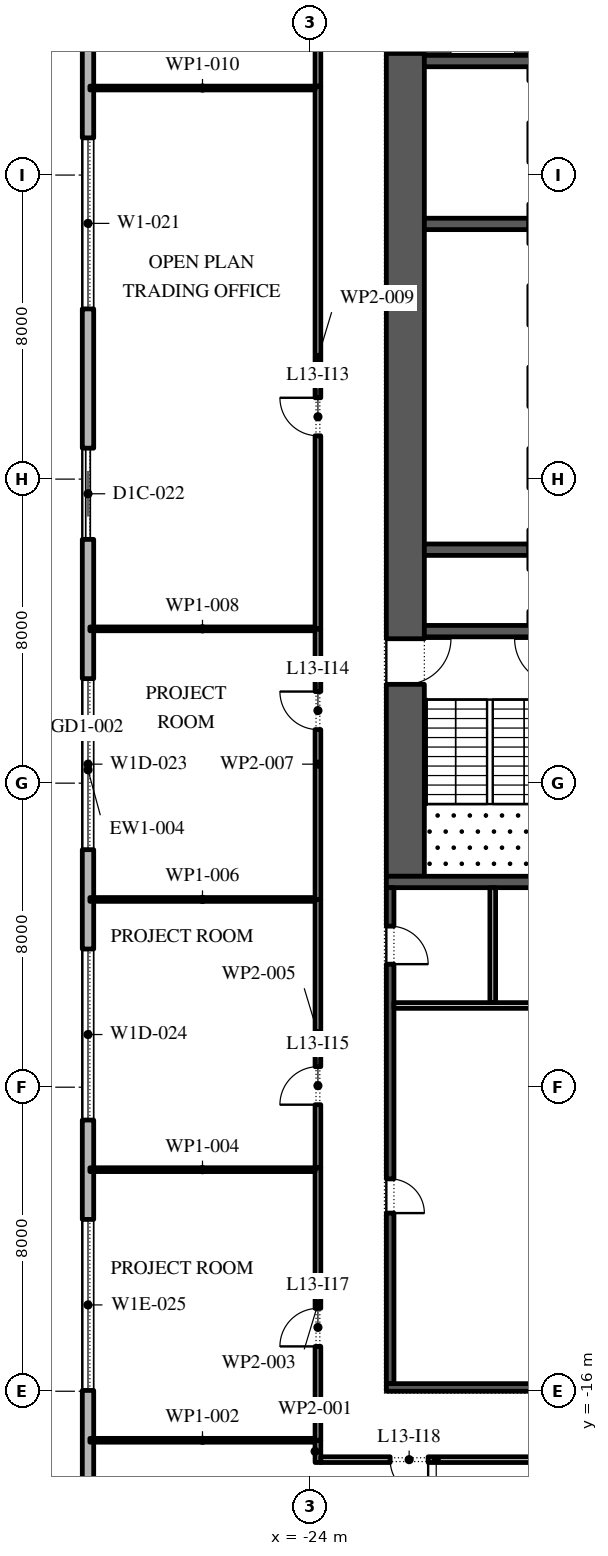
"""IFC4 building model, lengths in metres.
Left out: names, types, materials, properties, quantities, classifications, styles, units other than length and angle.
Written with IfcOpenShell. Run it as: python <this file> out.ifc"""

import sys

from ifc_helpers import new_model, si_unit, direction, frame, frame_2d, origin, place, context, subcontext, project, spatial, rectangle, extrude, element, fill, save


model = new_model("IFC4")
c1 = context("Model", 3, precision=1e-05, world=origin(), true_north=direction((0.0, 1.0)))
c2 = subcontext(c1, "Body", "Model", "MODEL_VIEW")
j1 = project(units=[si_unit("LENGTHUNIT", "METRE"), si_unit("PLANEANGLEUNIT", "RADIAN")], contexts=[c1])
p1 = place(None, origin())
s1 = spatial("IfcSite", under=j1, at=p1, CompositionType="ELEMENT")
p2 = place(p1, origin())
s2 = spatial("IfcBuilding", under=s1, at=p2, CompositionType="ELEMENT")
p3 = place(p2, frame((0.0, 0.0, 64.8)))
s3 = spatial("IfcBuildingStorey", under=s2, at=p3, CompositionType="ELEMENT", Elevation=64.8)
p4 = place(p3, frame((-29.85, 25.1, 0.0), z_axis=(0.0, 0.0, 1.0), x_axis=(0.0, -1.0, 0.0)))
e1 = element("IfcWall", 1, at=p4, inside=s3, PredefinedType="STANDARD", context=c2, shape_type="SweptSolid", body=[
    extrude(rectangle(XDim=49.5, YDim=0.3, at=frame_2d((24.75, 0.0))), origin(), (0.0, 0.0, 1.0), 4.0),
])
p5 = place(p4, frame((1.157, 0.0, 0.45)))
e2 = element("IfcOpeningElement", 2, at=p5, cuts=e1, PredefinedType="OPENING", context=c2, shape_type="SweptSolid", body=[
    extrude(rectangle(XDim=4.5, YDim=2.875, at=frame_2d((2.25, 1.438))), frame((0.0, 0.16, 0.0), z_axis=(0.0, -1.0, 0.0), x_axis=(1.0, 0.0, 0.0)), (0.0, 0.0, 1.0), 0.32),
])
p6 = place(p4, frame((8.121, 0.0, 0.45)))
e3 = element("IfcOpeningElement", 3, at=p6, cuts=e1, PredefinedType="OPENING", context=c2, shape_type="SweptSolid", body=[
    extrude(rectangle(XDim=4.5, YDim=3.05, at=frame_2d((2.25, 1.525))), frame((0.0, 0.16, 0.0), z_axis=(0.0, -1.0, 0.0), x_axis=(1.0, 0.0, 0.0)), (0.0, 0.0, 1.0), 0.32),
])
p7 = place(p4, frame((16.286, 0.0, 0.0)))
e4 = element("IfcOpeningElement", 4, at=p7, cuts=e1, PredefinedType="OPENING", context=c2, shape_type="SweptSolid", body=[
    extrude(rectangle(XDim=2.4, YDim=3.325, at=frame_2d((1.2, 1.663))), frame((0.0, 0.16, 0.0), z_axis=(0.0, -1.0, 0.0), x_axis=(1.0, 0.0, 0.0)), (0.0, 0.0, 1.0), 0.32),
])
p8 = place(p4, frame((22.35, 0.0, 0.45)))
e5 = element("IfcOpeningElement", 5, at=p8, cuts=e1, PredefinedType="OPENING", context=c2, shape_type="SweptSolid", body=[
    extrude(rectangle(XDim=4.5, YDim=2.875, at=frame_2d((2.25, 1.438))), frame((0.0, 0.16, 0.0), z_axis=(0.0, -1.0, 0.0), x_axis=(1.0, 0.0, 0.0)), (0.0, 0.0, 1.0), 0.32),
])
p9 = place(p4, frame((29.464, 0.0, 0.45)))
e6 = element("IfcOpeningElement", 6, at=p9, cuts=e1, PredefinedType="OPENING", context=c2, shape_type="SweptSolid", body=[
    extrude(rectangle(XDim=4.5, YDim=2.875, at=frame_2d((2.25, 1.438))), frame((0.0, 0.16, 0.0), z_axis=(0.0, -1.0, 0.0), x_axis=(1.0, 0.0, 0.0)), (0.0, 0.0, 1.0), 0.32),
])
p10 = place(p4, frame((36.579, 0.0, 0.45)))
e7 = element("IfcOpeningElement", 7, at=p10, cuts=e1, PredefinedType="OPENING", context=c2, shape_type="SweptSolid", body=[
    extrude(rectangle(XDim=4.5, YDim=2.825, at=frame_2d((2.25, 1.413))), frame((0.0, 0.16, 0.0), z_axis=(0.0, -1.0, 0.0), x_axis=(1.0, 0.0, 0.0)), (0.0, 0.0, 1.0), 0.32),
])
p11 = place(p4, frame((44.743, 0.0, 0.0)))
e8 = element("IfcOpeningElement", 8, at=p11, cuts=e1, PredefinedType="OPENING", context=c2, shape_type="SweptSolid", body=[
    extrude(rectangle(XDim=2.4, YDim=3.5, at=frame_2d((1.2, 1.75))), frame((0.0, 0.16, 0.0), z_axis=(0.0, -1.0, 0.0), x_axis=(1.0, 0.0, 0.0)), (0.0, 0.0, 1.0), 0.32),
])
p12 = place(p3, frame((-21.5, -2.45, 0.0), z_axis=(0.0, 0.0, 1.0), x_axis=(0.0, 1.0, 0.0)))
e9 = element("IfcWall", 9, at=p12, inside=s3, PredefinedType="SHEAR", context=c2, shape_type="SweptSolid", body=[
    extrude(rectangle(XDim=27.9, YDim=1.0, at=frame_2d((13.95, 0.0))), origin(), (0.0, 0.0, 1.0), 4.0),
])
p13 = place(p12, frame((5.05, 0.0, 0.0)))
e10 = element("IfcOpeningElement", 10, at=p13, cuts=e9, PredefinedType="OPENING", context=c2, shape_type="SweptSolid", body=[
    extrude(rectangle(XDim=1.2, YDim=2.1, at=frame_2d((0.6, 1.05))), frame((0.0, 0.51, 0.0), z_axis=(0.0, -1.0, 0.0), x_axis=(1.0, 0.0, 0.0)), (0.0, 0.0, 1.0), 1.02),
])
p14 = place(p12, frame((21.65, 0.0, 0.0)))
e11 = element("IfcOpeningElement", 11, at=p14, cuts=e9, PredefinedType="OPENING", context=c2, shape_type="SweptSolid", body=[
    extrude(rectangle(XDim=1.2, YDim=2.1, at=frame_2d((0.6, 1.05))), frame((0.0, 0.51, 0.0), z_axis=(0.0, -1.0, 0.0), x_axis=(1.0, 0.0, 0.0)), (0.0, 0.0, 1.0), 1.02),
])
p15 = place(p3, frame((-22.0, -2.6, 0.0), z_axis=(0.0, 0.0, 1.0), x_axis=(1.0, 0.0, 0.0)))
e12 = element("IfcWall", 12, at=p15, inside=s3, PredefinedType="SHEAR", context=c2, shape_type="SweptSolid", body=[
    extrude(rectangle(XDim=12.0, YDim=0.3, at=frame_2d((6.0, 0.0))), origin(), (0.0, 0.0, 1.0), 4.0),
])
for number, where, z_axis, x_axis in (
    (13, (-21.0, 4.0, 0.0), (0.0, 0.0, 1.0), (1.0, 0.0, 0.0)),
    (14, (-21.0, 19.0, 0.0), (0.0, 0.0, 1.0), (1.0, 0.0, 0.0)),
):
    element("IfcWall", number, at=place(p3, frame(where, z_axis=z_axis, x_axis=x_axis)), inside=s3, PredefinedType="SHEAR", context=c2, shape_type="SweptSolid", body=[
        extrude(rectangle(XDim=3.7, YDim=0.3, at=frame_2d((1.85, 0.0))), origin(), (0.0, 0.0, 1.0), 4.0),
    ])
for number, where, z_axis, x_axis in (
    (15, (-21.0, 6.143, 0.0), (0.0, 0.0, 1.0), (1.0, 0.0, 0.0)),
    (16, (-21.0, 14.714, 0.0), (0.0, 0.0, 1.0), (1.0, 0.0, 0.0)),
):
    element("IfcWall", number, at=place(p3, frame(where, z_axis=z_axis, x_axis=x_axis)), inside=s3, PredefinedType="SHEAR", context=c2, shape_type="SweptSolid", body=[
        extrude(rectangle(XDim=2.75, YDim=0.3, at=frame_2d((1.375, 0.0))), origin(), (0.0, 0.0, 1.0), 4.0),
    ])
p16 = place(p3, frame((-21.9, -15.8, 0.0), z_axis=(0.0, 0.0, 1.0), x_axis=(0.0, 1.0, 0.0)))
e17 = element("IfcWall", 17, at=p16, inside=s3, PredefinedType="SHEAR", context=c2, shape_type="SweptSolid", body=[
    extrude(rectangle(XDim=13.05, YDim=0.2, at=frame_2d((6.525, 0.0))), origin(), (0.0, 0.0, 1.0), 4.0),
])
p17 = place(p16, frame((4.488, 0.0, 0.0)))
e18 = element("IfcOpeningElement", 18, at=p17, cuts=e17, PredefinedType="OPENING", context=c2, shape_type="SweptSolid", body=[
    extrude(rectangle(XDim=0.9, YDim=2.1, at=frame_2d((0.45, 1.05))), frame((0.0, 0.11, 0.0), z_axis=(0.0, -1.0, 0.0), x_axis=(1.0, 0.0, 0.0)), (0.0, 0.0, 1.0), 0.22),
])
p18 = place(p16, frame((11.038, 0.0, 0.0)))
e19 = element("IfcOpeningElement", 19, at=p18, cuts=e17, PredefinedType="OPENING", context=c2, shape_type="SweptSolid", body=[
    extrude(rectangle(XDim=1.0, YDim=2.1, at=frame_2d((0.5, 1.05))), frame((0.0, 0.11, 0.0), z_axis=(0.0, -1.0, 0.0), x_axis=(1.0, 0.0, 0.0)), (0.0, 0.0, 1.0), 0.22),
])
p19 = place(p3, frame((-22.0, -15.9, 0.0), z_axis=(0.0, 0.0, 1.0), x_axis=(1.0, 0.0, 0.0)))
e20 = element("IfcWall", 20, at=p19, inside=s3, PredefinedType="SHEAR", context=c2, shape_type="SweptSolid", body=[
    extrude(rectangle(XDim=12.0, YDim=0.2, at=frame_2d((6.0, 0.0))), origin(), (0.0, 0.0, 1.0), 4.0),
])
p20 = place(p3, frame((-21.8, -5.85, 0.0), z_axis=(0.0, 0.0, 1.0), x_axis=(1.0, 0.0, 0.0)))
e21 = element("IfcWall", 21, at=p20, inside=s3, PredefinedType="PARTITIONING", context=c2, shape_type="SweptSolid", body=[
    extrude(rectangle(XDim=5.725, YDim=0.15, at=frame_2d((2.863, 0.0))), origin(), (0.0, 0.0, 1.0), 4.0),
])
p21 = place(p3, frame((-19.2, -5.775, 0.0), z_axis=(0.0, 0.0, 1.0), x_axis=(0.0, 1.0, 0.0)))
e22 = element("IfcWall", 22, at=p21, inside=s3, PredefinedType="PARTITIONING", context=c2, shape_type="SweptSolid", body=[
    extrude(rectangle(XDim=3.025, YDim=0.15, at=frame_2d((1.512, 0.0))), origin(), (0.0, 0.0, 1.0), 4.0),
])
p22 = place(p3, frame((-23.8, -17.875, 0.0), z_axis=(0.0, 0.0, 1.0), x_axis=(0.0, 1.0, 0.0)))
e23 = element("IfcWall", 23, at=p22, inside=s3, PredefinedType="PARTITIONING", context=c2, shape_type="SweptSolid", body=[
    extrude(rectangle(XDim=0.585, YDim=0.15, at=frame_2d((0.292, 0.0))), origin(), (0.0, 0.0, 1.0), 4.0),
])
p23 = place(p3, frame((-23.875, -17.29, 0.0), z_axis=(0.0, 0.0, 1.0), x_axis=(-1.0, 0.0, 0.0)))
e24 = element("IfcWall", 24, at=p23, inside=s3, PredefinedType="PARTITIONING", context=c2, shape_type="SweptSolid", body=[
    extrude(rectangle(XDim=5.925, YDim=0.1, at=frame_2d((2.962, 0.0))), origin(), (0.0, 0.0, 1.0), 4.0),
])
p24 = place(p3, frame((-23.8, -17.29, 0.0), z_axis=(0.0, 0.0, 1.0), x_axis=(0.0, 1.0, 0.0)))
e25 = element("IfcWall", 25, at=p24, inside=s3, PredefinedType="PARTITIONING", context=c2, shape_type="SweptSolid", body=[
    extrude(rectangle(XDim=7.17, YDim=0.15, at=frame_2d((3.585, 0.0))), origin(), (0.0, 0.0, 1.0), 4.0),
])
p25 = place(p24, frame((2.47, 0.0, 0.0)))
e26 = element("IfcOpeningElement", 26, at=p25, cuts=e25, PredefinedType="OPENING", context=c2, shape_type="SweptSolid", body=[
    extrude(rectangle(XDim=1.0, YDim=2.1, at=frame_2d((0.5, 1.05))), frame((0.0, 0.085, 0.0), z_axis=(0.0, -1.0, 0.0), x_axis=(1.0, 0.0, 0.0)), (0.0, 0.0, 1.0), 0.17),
])
p26 = place(p3, frame((-23.875, -10.17, 0.0), z_axis=(0.0, 0.0, 1.0), x_axis=(-1.0, 0.0, 0.0)))
e27 = element("IfcWall", 27, at=p26, inside=s3, PredefinedType="PARTITIONING", context=c2, shape_type="SweptSolid", body=[
    extrude(rectangle(XDim=5.925, YDim=0.1, at=frame_2d((2.962, 0.0))), origin(), (0.0, 0.0, 1.0), 4.0),
])
p27 = place(p3, frame((-23.8, -10.12, 0.0), z_axis=(0.0, 0.0, 1.0), x_axis=(0.0, 1.0, 0.0)))
e28 = element("IfcWall", 28, at=p27, inside=s3, PredefinedType="PARTITIONING", context=c2, shape_type="SweptSolid", body=[
    extrude(rectangle(XDim=7.06, YDim=0.15, at=frame_2d((3.53, 0.0))), origin(), (0.0, 0.0, 1.0), 4.0),
])
p28 = place(p27, frame((1.66, 0.0, 0.0)))
e29 = element("IfcOpeningElement", 29, at=p28, cuts=e28, PredefinedType="OPENING", context=c2, shape_type="SweptSolid", body=[
    extrude(rectangle(XDim=1.0, YDim=2.1, at=frame_2d((0.5, 1.05))), frame((0.0, 0.085, 0.0), z_axis=(0.0, -1.0, 0.0), x_axis=(1.0, 0.0, 0.0)), (0.0, 0.0, 1.0), 0.17),
])
p29 = place(p3, frame((-23.875, -3.06, 0.0), z_axis=(0.0, 0.0, 1.0), x_axis=(-1.0, 0.0, 0.0)))
e30 = element("IfcWall", 30, at=p29, inside=s3, PredefinedType="PARTITIONING", context=c2, shape_type="SweptSolid", body=[
    extrude(rectangle(XDim=5.925, YDim=0.1, at=frame_2d((2.962, 0.0))), origin(), (0.0, 0.0, 1.0), 4.0),
])
p30 = place(p3, frame((-23.8, -3.06, 0.0), z_axis=(0.0, 0.0, 1.0), x_axis=(0.0, 1.0, 0.0)))
e31 = element("IfcWall", 31, at=p30, inside=s3, PredefinedType="PARTITIONING", context=c2, shape_type="SweptSolid", body=[
    extrude(rectangle(XDim=7.12, YDim=0.15, at=frame_2d((3.56, 0.0))), origin(), (0.0, 0.0, 1.0), 4.0),
])
p31 = place(p30, frame((4.47, 0.0, 0.0)))
e32 = element("IfcOpeningElement", 32, at=p31, cuts=e31, PredefinedType="OPENING", context=c2, shape_type="SweptSolid", body=[
    extrude(rectangle(XDim=1.0, YDim=2.1, at=frame_2d((0.5, 1.05))), frame((0.0, 0.085, 0.0), z_axis=(0.0, -1.0, 0.0), x_axis=(1.0, 0.0, 0.0)), (0.0, 0.0, 1.0), 0.17),
])
p32 = place(p3, frame((-23.875, 4.06, 0.0), z_axis=(0.0, 0.0, 1.0), x_axis=(-1.0, 0.0, 0.0)))
e33 = element("IfcWall", 33, at=p32, inside=s3, PredefinedType="PARTITIONING", context=c2, shape_type="SweptSolid", body=[
    extrude(rectangle(XDim=5.925, YDim=0.1, at=frame_2d((2.962, 0.0))), origin(), (0.0, 0.0, 1.0), 4.0),
])
p33 = place(p3, frame((-23.8, 4.06, 0.0), z_axis=(0.0, 0.0, 1.0), x_axis=(0.0, 1.0, 0.0)))
e34 = element("IfcWall", 34, at=p33, inside=s3, PredefinedType="PARTITIONING", context=c2, shape_type="SweptSolid", body=[
    extrude(rectangle(XDim=14.28, YDim=0.15, at=frame_2d((7.14, 0.0))), origin(), (0.0, 0.0, 1.0), 4.0),
])
p34 = place(p33, frame((5.08, 0.0, 0.0)))
e35 = element("IfcOpeningElement", 35, at=p34, cuts=e34, PredefinedType="OPENING", context=c2, shape_type="SweptSolid", body=[
    extrude(rectangle(XDim=1.0, YDim=2.1, at=frame_2d((0.5, 1.05))), frame((0.0, 0.085, 0.0), z_axis=(0.0, -1.0, 0.0), x_axis=(1.0, 0.0, 0.0)), (0.0, 0.0, 1.0), 0.17),
])
p35 = place(p3, frame((-23.875, 18.29, 0.0), z_axis=(0.0, 0.0, 1.0), x_axis=(-1.0, 0.0, 0.0)))
e36 = element("IfcWall", 36, at=p35, inside=s3, PredefinedType="PARTITIONING", context=c2, shape_type="SweptSolid", body=[
    extrude(rectangle(XDim=5.925, YDim=0.1, at=frame_2d((2.962, 0.0))), origin(), (0.0, 0.0, 1.0), 4.0),
])
p36 = place(p3, frame((-23.8, 18.34, 0.0), z_axis=(0.0, 0.0, 1.0), x_axis=(0.0, 1.0, 0.0)))
e37 = element("IfcWall", 37, at=p36, inside=s3, PredefinedType="PARTITIONING", context=c2, shape_type="SweptSolid", body=[
    extrude(rectangle(XDim=8.86, YDim=0.15, at=frame_2d((4.43, 0.0))), origin(), (0.0, 0.0, 1.0), 4.0),
])
p37 = place(p36, frame((5.71, 0.0, 0.0)))
e38 = element("IfcOpeningElement", 38, at=p37, cuts=e37, PredefinedType="OPENING", context=c2, shape_type="SweptSolid", body=[
    extrude(rectangle(XDim=1.0, YDim=2.1, at=frame_2d((0.5, 1.05))), frame((0.0, 0.085, 0.0), z_axis=(0.0, -1.0, 0.0), x_axis=(1.0, 0.0, 0.0)), (0.0, 0.0, 1.0), 0.17),
])
p38 = place(p3, frame((-17.65, -17.8, 0.0), z_axis=(0.0, 0.0, 1.0), x_axis=(-1.0, 0.0, 0.0)))
e39 = element("IfcWall", 39, at=p38, inside=s3, PredefinedType="PARTITIONING", context=c2, shape_type="SweptSolid", body=[
    extrude(rectangle(XDim=6.075, YDim=0.15, at=frame_2d((3.038, 0.0))), origin(), (0.0, 0.0, 1.0), 4.0),
])
p39 = place(p38, frame((3.25, 0.0, 0.0)))
e40 = element("IfcOpeningElement", 40, at=p39, cuts=e39, PredefinedType="OPENING", context=c2, shape_type="SweptSolid", body=[
    extrude(rectangle(XDim=1.0, YDim=2.1, at=frame_2d((0.5, 1.05))), frame((0.0, 0.085, 0.0), z_axis=(0.0, -1.0, 0.0), x_axis=(1.0, 0.0, 0.0)), (0.0, 0.0, 1.0), 0.17),
])
p40 = place(p6, origin())
e41 = element("IfcWindow", 41, at=p40, inside=s3, PartitioningType="DOUBLE_PANEL_VERTICAL", PredefinedType="WINDOW", context=c2, shape_type="SweptSolid", body=[
    extrude(rectangle(XDim=4.5, YDim=3.05, at=frame_2d((2.25, 1.525))), frame((0.0, 0.03, 0.0), z_axis=(0.0, -1.0, 0.0), x_axis=(1.0, 0.0, 0.0)), (0.0, 0.0, 1.0), 0.06),
])
fill(e3, e41)
p41 = place(p7, origin())
e42 = element("IfcDoor", 42, at=p41, inside=s3, OperationType="DOUBLE_DOOR_SLIDING", PredefinedType="DOOR", context=c2, shape_type="SweptSolid", body=[
    extrude(rectangle(XDim=2.4, YDim=3.325, at=frame_2d((1.2, 1.663))), frame((0.0, 0.025, 0.0), z_axis=(0.0, -1.0, 0.0), x_axis=(1.0, 0.0, 0.0)), (0.0, 0.0, 1.0), 0.05),
])
fill(e4, e42)
p42 = place(p8, origin())
e43 = element("IfcWindow", 43, at=p42, inside=s3, PartitioningType="DOUBLE_PANEL_VERTICAL", PredefinedType="WINDOW", context=c2, shape_type="SweptSolid", body=[
    extrude(rectangle(XDim=4.5, YDim=2.875, at=frame_2d((2.25, 1.438))), frame((0.0, 0.03, 0.0), z_axis=(0.0, -1.0, 0.0), x_axis=(1.0, 0.0, 0.0)), (0.0, 0.0, 1.0), 0.06),
])
fill(e5, e43)
p43 = place(p9, origin())
e44 = element("IfcWindow", 44, at=p43, inside=s3, PartitioningType="DOUBLE_PANEL_VERTICAL", PredefinedType="WINDOW", context=c2, shape_type="SweptSolid", body=[
    extrude(rectangle(XDim=4.5, YDim=2.875, at=frame_2d((2.25, 1.438))), frame((0.0, 0.03, 0.0), z_axis=(0.0, -1.0, 0.0), x_axis=(1.0, 0.0, 0.0)), (0.0, 0.0, 1.0), 0.06),
])
fill(e6, e44)
p44 = place(p10, origin())
e45 = element("IfcWindow", 45, at=p44, inside=s3, PartitioningType="DOUBLE_PANEL_VERTICAL", PredefinedType="WINDOW", context=c2, shape_type="SweptSolid", body=[
    extrude(rectangle(XDim=4.5, YDim=2.825, at=frame_2d((2.25, 1.413))), frame((0.0, 0.03, 0.0), z_axis=(0.0, -1.0, 0.0), x_axis=(1.0, 0.0, 0.0)), (0.0, 0.0, 1.0), 0.06),
])
fill(e7, e45)
p45 = place(p13, frame((1.2, 0.0, 0.0), z_axis=(0.0, 0.0, 1.0), x_axis=(-1.0, 0.0, 0.0)))
e46 = element("IfcDoor", 46, at=p45, inside=s3, OperationType="SINGLE_SWING_RIGHT", PredefinedType="DOOR", context=c2, shape_type="SweptSolid", body=[
    extrude(rectangle(XDim=1.2, YDim=2.1, at=frame_2d((0.6, 1.05))), frame((0.0, 0.025, 0.0), z_axis=(0.0, -1.0, 0.0), x_axis=(1.0, 0.0, 0.0)), (0.0, 0.0, 1.0), 0.05),
])
fill(e10, e46)
p46 = place(p14, frame((1.2, 0.0, 0.0), z_axis=(0.0, 0.0, 1.0), x_axis=(-1.0, 0.0, 0.0)))
e47 = element("IfcDoor", 47, at=p46, inside=s3, OperationType="SINGLE_SWING_LEFT", PredefinedType="DOOR", context=c2, shape_type="SweptSolid", body=[
    extrude(rectangle(XDim=1.2, YDim=2.1, at=frame_2d((0.6, 1.05))), frame((0.0, 0.025, 0.0), z_axis=(0.0, -1.0, 0.0), x_axis=(1.0, 0.0, 0.0)), (0.0, 0.0, 1.0), 0.05),
])
fill(e11, e47)
p47 = place(p17, frame((0.9, -0.15, 0.0), z_axis=(0.0, 0.0, 1.0), x_axis=(-1.0, 0.0, 0.0)))
e48 = element("IfcDoor", 48, at=p47, inside=s3, OperationType="SINGLE_SWING_LEFT", PredefinedType="DOOR", context=c2, shape_type="SweptSolid", body=[
    extrude(rectangle(XDim=0.9, YDim=2.1, at=frame_2d((0.45, 1.05))), frame((0.0, -0.05, 0.0), z_axis=(0.0, -1.0, 0.0), x_axis=(1.0, 0.0, 0.0)), (0.0, 0.0, 1.0), 0.05),
])
fill(e18, e48)
p48 = place(p18, frame((1.0, -0.15, 0.0), z_axis=(0.0, 0.0, 1.0), x_axis=(-1.0, 0.0, 0.0)))
e49 = element("IfcDoor", 49, at=p48, inside=s3, OperationType="SINGLE_SWING_LEFT", PredefinedType="DOOR", context=c2, shape_type="SweptSolid", body=[
    extrude(rectangle(XDim=1.0, YDim=2.1, at=frame_2d((0.5, 1.05))), frame((0.0, -0.05, 0.0), z_axis=(0.0, -1.0, 0.0), x_axis=(1.0, 0.0, 0.0)), (0.0, 0.0, 1.0), 0.05),
])
fill(e19, e49)
p49 = place(p34, origin())
e50 = element("IfcDoor", 50, at=p49, inside=s3, OperationType="SINGLE_SWING_LEFT", PredefinedType="DOOR", context=c2, shape_type="SweptSolid", body=[
    extrude(rectangle(XDim=1.0, YDim=2.1, at=frame_2d((0.5, 1.05))), frame((0.0, 0.025, 0.0), z_axis=(0.0, -1.0, 0.0), x_axis=(1.0, 0.0, 0.0)), (0.0, 0.0, 1.0), 0.05),
])
fill(e35, e50)
p50 = place(p31, origin())
e51 = element("IfcDoor", 51, at=p50, inside=s3, OperationType="SINGLE_SWING_LEFT", PredefinedType="DOOR", context=c2, shape_type="SweptSolid", body=[
    extrude(rectangle(XDim=1.0, YDim=2.1, at=frame_2d((0.5, 1.05))), frame((0.0, 0.025, 0.0), z_axis=(0.0, -1.0, 0.0), x_axis=(1.0, 0.0, 0.0)), (0.0, 0.0, 1.0), 0.05),
])
fill(e32, e51)
p51 = place(p28, origin())
e52 = element("IfcDoor", 52, at=p51, inside=s3, OperationType="SINGLE_SWING_RIGHT", PredefinedType="DOOR", context=c2, shape_type="SweptSolid", body=[
    extrude(rectangle(XDim=1.0, YDim=2.1, at=frame_2d((0.5, 1.05))), frame((0.0, 0.025, 0.0), z_axis=(0.0, -1.0, 0.0), x_axis=(1.0, 0.0, 0.0)), (0.0, 0.0, 1.0), 0.05),
])
fill(e29, e52)
p52 = place(p25, origin())
e53 = element("IfcDoor", 53, at=p52, inside=s3, OperationType="SINGLE_SWING_RIGHT", PredefinedType="DOOR", context=c2, shape_type="SweptSolid", body=[
    extrude(rectangle(XDim=1.0, YDim=2.1, at=frame_2d((0.5, 1.05))), frame((0.0, 0.025, 0.0), z_axis=(0.0, -1.0, 0.0), x_axis=(1.0, 0.0, 0.0)), (0.0, 0.0, 1.0), 0.05),
])
fill(e26, e53)
p53 = place(p39, origin())
e54 = element("IfcDoor", 54, at=p53, inside=s3, OperationType="SINGLE_SWING_RIGHT", PredefinedType="DOOR", context=c2, shape_type="SweptSolid", body=[
    extrude(rectangle(XDim=1.0, YDim=2.1, at=frame_2d((0.5, 1.05))), frame((0.0, 0.025, 0.0), z_axis=(0.0, -1.0, 0.0), x_axis=(1.0, 0.0, 0.0)), (0.0, 0.0, 1.0), 0.05),
])
fill(e40, e54)
save(model, sys.argv[1])
